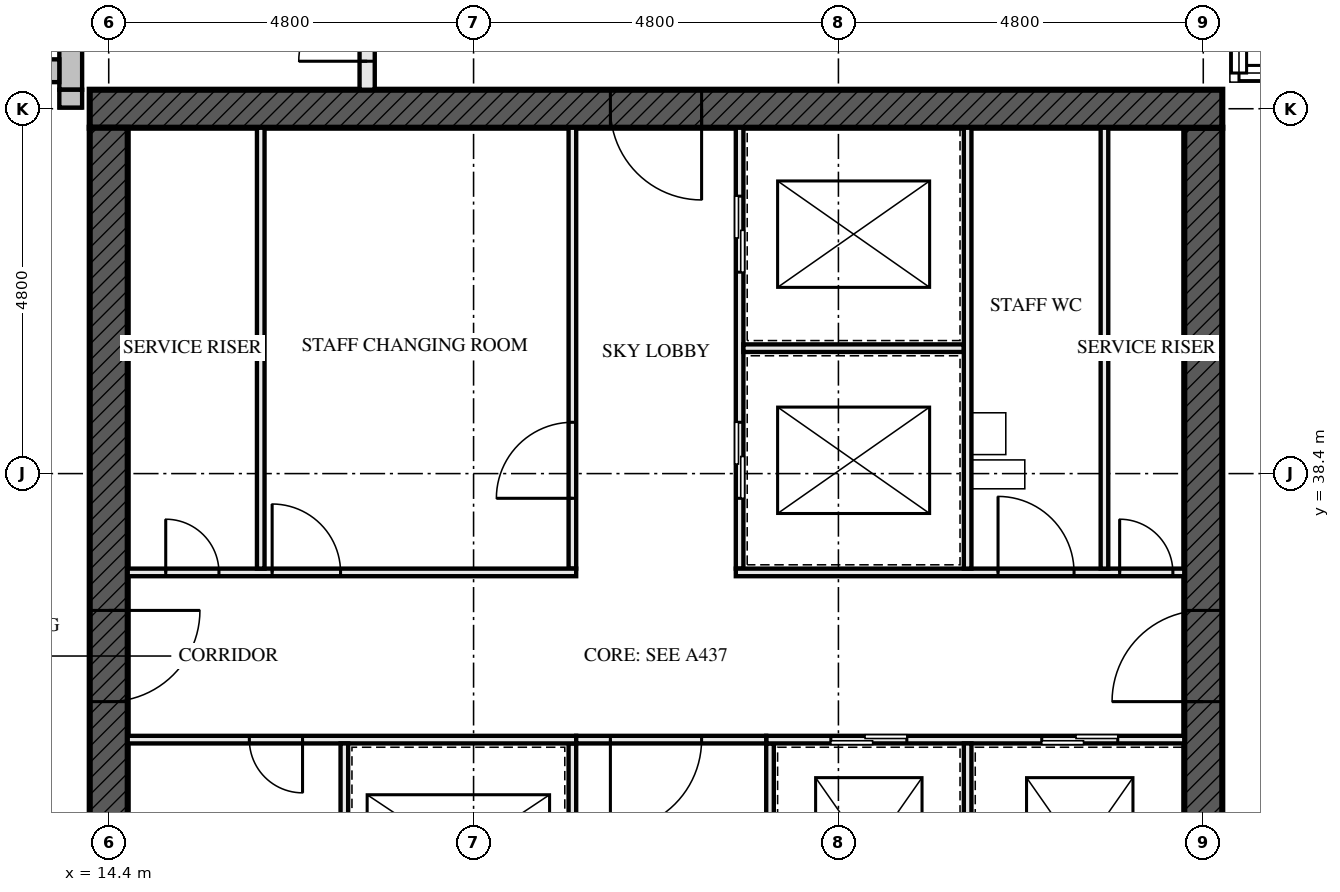
"""IFC4 building model, lengths in metres.
Left out: names, types, materials, properties, quantities, classifications, styles, units other than length and angle.
Written with IfcOpenShell. Run it as: python <this file> out.ifc"""

import sys

from ifc_helpers import new_model, si_unit, direction, frame, frame_2d, origin, place, context, subcontext, project, spatial, rectangle, extrude, element, fill, save


model = new_model("IFC4")
c1 = context("Model", 3, precision=1e-05, world=origin(), true_north=direction((0.0, 1.0)))
c2 = subcontext(c1, "Body", "Model", "MODEL_VIEW")
j1 = project(units=[si_unit("LENGTHUNIT", "METRE"), si_unit("PLANEANGLEUNIT", "RADIAN")], contexts=[c1])
p1 = place(None, origin())
s1 = spatial("IfcSite", under=j1, at=p1, CompositionType="ELEMENT")
p2 = place(p1, origin())
s2 = spatial("IfcBuilding", under=s1, at=p2, CompositionType="ELEMENT")
p3 = place(p2, frame((0.0, 0.0, 141.0)))
s3 = spatial("IfcBuildingStorey", under=s2, at=p3, CompositionType="ELEMENT", Elevation=141.0)
p4 = place(p3, frame((29.05, 43.2, -0.17), z_axis=(0.0, 0.0, 1.0), x_axis=(-1.0, 0.0, 0.0)))
e1 = element("IfcWall", 1, at=p4, inside=s3, PredefinedType="SHEAR", context=c2, shape_type="SweptSolid", body=[
    extrude(rectangle(XDim=14.9, YDim=0.5, at=frame_2d((7.45, 0.0))), origin(), (0.0, 0.0, 1.0), 3.5),
])
p5 = place(p4, frame((6.85, 0.0, 0.17)))
e2 = element("IfcOpeningElement", 2, at=p5, cuts=e1, PredefinedType="OPENING", context=c2, shape_type="SweptSolid", body=[
    extrude(rectangle(XDim=1.2, YDim=2.1, at=frame_2d((0.6, 1.05))), frame((0.0, 0.26, 0.0), z_axis=(0.0, -1.0, 0.0), x_axis=(1.0, 0.0, 0.0)), (0.0, 0.0, 1.0), 0.521),
])
p6 = place(p3, frame((14.4, 42.95, -0.17), z_axis=(0.0, 0.0, 1.0), x_axis=(0.0, -1.0, 0.0)))
e3 = element("IfcWall", 3, at=p6, inside=s3, PredefinedType="SHEAR", context=c2, shape_type="SweptSolid", body=[
    extrude(rectangle(XDim=13.9, YDim=0.5, at=frame_2d((6.95, 0.0))), origin(), (0.0, 0.0, 1.0), 3.5),
])
p7 = place(p6, frame((6.35, 0.0, 0.17)))
e4 = element("IfcOpeningElement", 4, at=p7, cuts=e3, PredefinedType="OPENING", context=c2, shape_type="SweptSolid", body=[
    extrude(rectangle(XDim=1.2, YDim=2.1, at=frame_2d((0.6, 1.05))), frame((0.0, 0.26, 0.0), z_axis=(0.0, -1.0, 0.0), x_axis=(1.0, 0.0, 0.0)), (0.0, 0.0, 1.0), 0.521),
])
p8 = place(p3, frame((28.8, 29.05, -0.17), z_axis=(0.0, 0.0, 1.0), x_axis=(0.0, 1.0, 0.0)))
e5 = element("IfcWall", 5, at=p8, inside=s3, PredefinedType="SHEAR", context=c2, shape_type="SweptSolid", body=[
    extrude(rectangle(XDim=13.9, YDim=0.5, at=frame_2d((6.95, 0.0))), origin(), (0.0, 0.0, 1.0), 3.5),
])
p9 = place(p8, frame((6.35, 0.0, 0.17)))
e6 = element("IfcOpeningElement", 6, at=p9, cuts=e5, PredefinedType="OPENING", context=c2, shape_type="SweptSolid", body=[
    extrude(rectangle(XDim=1.2, YDim=2.1, at=frame_2d((0.6, 1.05))), frame((0.0, 0.26, 0.0), z_axis=(0.0, -1.0, 0.0), x_axis=(1.0, 0.0, 0.0)), (0.0, 0.0, 1.0), 0.521),
])
p10 = place(p3, frame((13.9, 53.15, 0.0), z_axis=(0.0, 0.0, 1.0), x_axis=(0.0, -1.0, 0.0)))
e7 = element("IfcWall", 7, at=p10, inside=s3, PredefinedType="SOLIDWALL", context=c2, shape_type="SweptSolid", body=[
    extrude(rectangle(XDim=9.7, YDim=0.3, at=frame_2d((4.85, 0.0))), origin(), (0.0, 0.0, 1.0), 3.5),
])
p11 = place(p10, frame((2.25, 0.0, 0.0)))
e8 = element("IfcOpeningElement", 8, at=p11, cuts=e7, PredefinedType="OPENING", context=c2, shape_type="SweptSolid", body=[
    extrude(rectangle(XDim=1.0, YDim=2.4, at=frame_2d((0.5, 1.2))), frame((0.0, 0.161, 0.0), z_axis=(0.0, -1.0, 0.0), x_axis=(1.0, 0.0, 0.0)), (0.0, 0.0, 1.0), 0.321),
])
p12 = place(p10, frame((6.35, 0.0, 0.6)))
e9 = element("IfcOpeningElement", 9, at=p12, cuts=e7, PredefinedType="OPENING", context=c2, shape_type="SweptSolid", body=[
    extrude(rectangle(XDim=2.4, YDim=1.8, at=frame_2d((1.2, 0.9))), frame((0.0, 0.161, 0.0), z_axis=(0.0, -1.0, 0.0), x_axis=(1.0, 0.0, 0.0)), (0.0, 0.0, 1.0), 0.321),
])
p13 = place(p3, frame((13.75, 43.7, 0.0), z_axis=(0.0, 0.0, 1.0), x_axis=(-1.0, 0.0, 0.0)))
e10 = element("IfcWall", 10, at=p13, inside=s3, PredefinedType="SOLIDWALL", context=c2, shape_type="SweptSolid", body=[
    extrude(rectangle(XDim=9.6, YDim=0.3, at=frame_2d((4.8, 0.0))), origin(), (0.0, 0.0, 1.0), 3.5),
])
p14 = place(p13, frame((5.35, 0.0, 0.6)))
e11 = element("IfcOpeningElement", 11, at=p14, cuts=e10, PredefinedType="OPENING", context=c2, shape_type="SweptSolid", body=[
    extrude(rectangle(XDim=2.4, YDim=1.8, at=frame_2d((1.2, 0.9))), frame((0.0, 0.161, 0.0), z_axis=(0.0, -1.0, 0.0), x_axis=(1.0, 0.0, 0.0)), (0.0, 0.0, 1.0), 0.321),
])
p15 = place(p13, frame((0.55, 0.0, 0.6)))
e12 = element("IfcOpeningElement", 12, at=p15, cuts=e10, PredefinedType="OPENING", context=c2, shape_type="SweptSolid", body=[
    extrude(rectangle(XDim=2.4, YDim=1.8, at=frame_2d((1.2, 0.9))), frame((0.0, 0.161, 0.0), z_axis=(0.0, -1.0, 0.0), x_axis=(1.0, 0.0, 0.0)), (0.0, 0.0, 1.0), 0.321),
])
p16 = place(p3, frame((13.9, 43.45, 2.39), z_axis=(0.0, 0.0, 1.0), x_axis=(0.0, -1.0, 0.0)))
e13 = element("IfcWall", 13, at=p16, inside=s3, PredefinedType="SOLIDWALL", context=c2, shape_type="SweptSolid", body=[
    extrude(rectangle(XDim=0.235, YDim=0.3, at=frame_2d((0.117, 0.0))), origin(), (0.0, 0.0, 1.0), 0.88),
])
for number, where, z_axis, x_axis in (
    (14, (16.4, 37.15, 0.0), (0.0, 0.0, 1.0), (0.0, 1.0, 0.0)),
    (15, (27.5, 37.15, 0.0), (0.0, 0.0, 1.0), (0.0, 1.0, 0.0)),
):
    element("IfcWall", number, at=place(p3, frame(where, z_axis=z_axis, x_axis=x_axis)), inside=s3, PredefinedType="SOLIDWALL", context=c2, shape_type="SweptSolid", body=[
        extrude(rectangle(XDim=5.8, YDim=0.1, at=frame_2d((2.9, 0.0))), origin(), (0.0, 0.0, 1.0), 3.33),
    ])
p17 = place(p3, frame((20.5, 29.05, 0.0), z_axis=(0.0, 0.0, 1.0), x_axis=(0.0, 1.0, 0.0)))
e16 = element("IfcWall", 16, at=p17, inside=s3, PredefinedType="SOLIDWALL", context=c2, shape_type="SweptSolid", body=[
    extrude(rectangle(XDim=5.8, YDim=0.1, at=frame_2d((2.9, 0.0))), origin(), (0.0, 0.0, 1.0), 3.33),
])
p18 = place(p17, frame((0.8, 0.0, 0.0)))
e17 = element("IfcOpeningElement", 17, at=p18, cuts=e16, PredefinedType="OPENING", context=c2, shape_type="SweptSolid", body=[
    extrude(rectangle(XDim=1.1, YDim=2.3, at=frame_2d((0.55, 1.15))), frame((0.0, 0.061, 0.0), z_axis=(0.0, -1.0, 0.0), x_axis=(1.0, 0.0, 0.0)), (0.0, 0.0, 1.0), 0.121),
])
p19 = place(p17, frame((3.775, 0.0, 0.0)))
e18 = element("IfcOpeningElement", 18, at=p19, cuts=e16, PredefinedType="OPENING", context=c2, shape_type="SweptSolid", body=[
    extrude(rectangle(XDim=1.1, YDim=2.3, at=frame_2d((0.55, 1.15))), frame((0.0, 0.061, 0.0), z_axis=(0.0, -1.0, 0.0), x_axis=(1.0, 0.0, 0.0)), (0.0, 0.0, 1.0), 0.121),
])
p20 = place(p3, frame((20.5, 37.15, 0.0), z_axis=(0.0, 0.0, 1.0), x_axis=(0.0, 1.0, 0.0)))
e19 = element("IfcWall", 19, at=p20, inside=s3, PredefinedType="SOLIDWALL", context=c2, shape_type="SweptSolid", body=[
    extrude(rectangle(XDim=5.8, YDim=0.1, at=frame_2d((2.9, 0.0))), origin(), (0.0, 0.0, 1.0), 3.33),
])
p21 = place(p20, frame((0.925, 0.0, 0.0)))
e20 = element("IfcOpeningElement", 20, at=p21, cuts=e19, PredefinedType="OPENING", context=c2, shape_type="SweptSolid", body=[
    extrude(rectangle(XDim=1.0, YDim=2.1, at=frame_2d((0.5, 1.05))), frame((0.0, 0.061, 0.0), z_axis=(0.0, -1.0, 0.0), x_axis=(1.0, 0.0, 0.0)), (0.0, 0.0, 1.0), 0.121),
])
p22 = place(p3, frame((22.7, 37.15, 0.0), z_axis=(0.0, 0.0, 1.0), x_axis=(0.0, 1.0, 0.0)))
e21 = element("IfcWall", 21, at=p22, inside=s3, PredefinedType="SOLIDWALL", context=c2, shape_type="SweptSolid", body=[
    extrude(rectangle(XDim=5.8, YDim=0.1, at=frame_2d((2.9, 0.0))), origin(), (0.0, 0.0, 1.0), 3.33),
])
p23 = place(p22, frame((0.925, 0.0, 0.0)))
e22 = element("IfcOpeningElement", 22, at=p23, cuts=e21, PredefinedType="OPENING", context=c2, shape_type="SweptSolid", body=[
    extrude(rectangle(XDim=1.0, YDim=2.1, at=frame_2d((0.5, 1.05))), frame((0.0, 0.061, 0.0), z_axis=(0.0, -1.0, 0.0), x_axis=(1.0, 0.0, 0.0)), (0.0, 0.0, 1.0), 0.121),
])
p24 = place(p22, frame((3.9, 0.0, 0.0)))
e23 = element("IfcOpeningElement", 23, at=p24, cuts=e21, PredefinedType="OPENING", context=c2, shape_type="SweptSolid", body=[
    extrude(rectangle(XDim=1.0, YDim=2.1, at=frame_2d((0.5, 1.05))), frame((0.0, 0.061, 0.0), z_axis=(0.0, -1.0, 0.0), x_axis=(1.0, 0.0, 0.0)), (0.0, 0.0, 1.0), 0.121),
])
p25 = place(p3, frame((23.1, 29.05, 0.0), z_axis=(0.0, 0.0, 1.0), x_axis=(0.0, 1.0, 0.0)))
e24 = element("IfcWall", 24, at=p25, inside=s3, PredefinedType="SOLIDWALL", context=c2, shape_type="SweptSolid", body=[
    extrude(rectangle(XDim=5.8, YDim=0.1, at=frame_2d((2.9, 0.0))), origin(), (0.0, 0.0, 1.0), 3.33),
])
p26 = place(p25, frame((1.0, 0.0, 0.0)))
e25 = element("IfcOpeningElement", 25, at=p26, cuts=e24, PredefinedType="OPENING", context=c2, shape_type="SweptSolid", body=[
    extrude(rectangle(XDim=0.7, YDim=2.1, at=frame_2d((0.35, 1.05))), frame((0.0, 0.061, 0.0), z_axis=(0.0, -1.0, 0.0), x_axis=(1.0, 0.0, 0.0)), (0.0, 0.0, 1.0), 0.121),
])
p27 = place(p3, frame((14.65, 34.9, 0.0), z_axis=(0.0, 0.0, 1.0), x_axis=(1.0, 0.0, 0.0)))
e26 = element("IfcWall", 26, at=p27, inside=s3, PredefinedType="SOLIDWALL", context=c2, shape_type="SweptSolid", body=[
    extrude(rectangle(XDim=5.9, YDim=0.1, at=frame_2d((2.95, 0.0))), origin(), (0.0, 0.0, 1.0), 3.33),
])
p28 = place(p27, frame((1.6, 0.0, 0.0)))
e27 = element("IfcOpeningElement", 27, at=p28, cuts=e26, PredefinedType="OPENING", context=c2, shape_type="SweptSolid", body=[
    extrude(rectangle(XDim=0.7, YDim=2.1, at=frame_2d((0.35, 1.05))), frame((0.0, 0.061, 0.0), z_axis=(0.0, -1.0, 0.0), x_axis=(1.0, 0.0, 0.0)), (0.0, 0.0, 1.0), 0.121),
])
p29 = place(p3, frame((23.05, 34.9, 0.0), z_axis=(0.0, 0.0, 1.0), x_axis=(1.0, 0.0, 0.0)))
e28 = element("IfcWall", 28, at=p29, inside=s3, PredefinedType="SOLIDWALL", context=c2, shape_type="SweptSolid", body=[
    extrude(rectangle(XDim=5.5, YDim=0.1, at=frame_2d((2.75, 0.0))), origin(), (0.0, 0.0, 1.0), 3.33),
])
p30 = place(p29, frame((0.85, 0.0, 0.0)))
e29 = element("IfcOpeningElement", 29, at=p30, cuts=e28, PredefinedType="OPENING", context=c2, shape_type="SweptSolid", body=[
    extrude(rectangle(XDim=1.0, YDim=2.1, at=frame_2d((0.5, 1.05))), frame((0.0, 0.061, 0.0), z_axis=(0.0, -1.0, 0.0), x_axis=(1.0, 0.0, 0.0)), (0.0, 0.0, 1.0), 0.121),
])
p31 = place(p29, frame((3.625, 0.0, 0.0)))
e30 = element("IfcOpeningElement", 30, at=p31, cuts=e28, PredefinedType="OPENING", context=c2, shape_type="SweptSolid", body=[
    extrude(rectangle(XDim=1.0, YDim=2.1, at=frame_2d((0.5, 1.05))), frame((0.0, 0.061, 0.0), z_axis=(0.0, -1.0, 0.0), x_axis=(1.0, 0.0, 0.0)), (0.0, 0.0, 1.0), 0.121),
])
p32 = place(p3, frame((14.65, 37.1, 0.0), z_axis=(0.0, 0.0, 1.0), x_axis=(1.0, 0.0, 0.0)))
e31 = element("IfcWall", 31, at=p32, inside=s3, PredefinedType="SOLIDWALL", context=c2, shape_type="SweptSolid", body=[
    extrude(rectangle(XDim=5.9, YDim=0.1, at=frame_2d((2.95, 0.0))), origin(), (0.0, 0.0, 1.0), 3.33),
])
p33 = place(p32, frame((0.5, 0.0, 0.0)))
e32 = element("IfcOpeningElement", 32, at=p33, cuts=e31, PredefinedType="OPENING", context=c2, shape_type="SweptSolid", body=[
    extrude(rectangle(XDim=0.7, YDim=2.1, at=frame_2d((0.35, 1.05))), frame((0.0, 0.061, 0.0), z_axis=(0.0, -1.0, 0.0), x_axis=(1.0, 0.0, 0.0)), (0.0, 0.0, 1.0), 0.121),
])
p34 = place(p32, frame((1.9, 0.0, 0.0)))
e33 = element("IfcOpeningElement", 33, at=p34, cuts=e31, PredefinedType="OPENING", context=c2, shape_type="SweptSolid", body=[
    extrude(rectangle(XDim=0.9, YDim=2.1, at=frame_2d((0.45, 1.05))), frame((0.0, 0.061, 0.0), z_axis=(0.0, -1.0, 0.0), x_axis=(1.0, 0.0, 0.0)), (0.0, 0.0, 1.0), 0.121),
])
p35 = place(p3, frame((22.65, 37.1, 0.0), z_axis=(0.0, 0.0, 1.0), x_axis=(1.0, 0.0, 0.0)))
e34 = element("IfcWall", 34, at=p35, inside=s3, PredefinedType="SOLIDWALL", context=c2, shape_type="SweptSolid", body=[
    extrude(rectangle(XDim=5.9, YDim=0.1, at=frame_2d((2.95, 0.0))), origin(), (0.0, 0.0, 1.0), 3.33),
])
p36 = place(p35, frame((3.45, 0.0, 0.0)))
e35 = element("IfcOpeningElement", 35, at=p36, cuts=e34, PredefinedType="OPENING", context=c2, shape_type="SweptSolid", body=[
    extrude(rectangle(XDim=1.0, YDim=2.1, at=frame_2d((0.5, 1.05))), frame((0.0, 0.061, 0.0), z_axis=(0.0, -1.0, 0.0), x_axis=(1.0, 0.0, 0.0)), (0.0, 0.0, 1.0), 0.121),
])
p37 = place(p35, frame((5.05, 0.0, 0.0)))
e36 = element("IfcOpeningElement", 36, at=p37, cuts=e34, PredefinedType="OPENING", context=c2, shape_type="SweptSolid", body=[
    extrude(rectangle(XDim=0.7, YDim=2.1, at=frame_2d((0.35, 1.05))), frame((0.0, 0.061, 0.0), z_axis=(0.0, -1.0, 0.0), x_axis=(1.0, 0.0, 0.0)), (0.0, 0.0, 1.0), 0.121),
])
p38 = place(p3, frame((20.55, 34.9, 0.0), z_axis=(0.0, 0.0, 1.0), x_axis=(1.0, 0.0, 0.0)))
e37 = element("IfcWall", 37, at=p38, inside=s3, PredefinedType="SOLIDWALL", context=c2, shape_type="SweptSolid", body=[
    extrude(rectangle(XDim=2.5, YDim=0.1, at=frame_2d((1.25, 0.0))), origin(), (0.0, 0.0, 1.0), 3.33),
])
p39 = place(p38, frame((0.45, 0.0, 0.0)))
e38 = element("IfcOpeningElement", 38, at=p39, cuts=e37, PredefinedType="OPENING", context=c2, shape_type="SweptSolid", body=[
    extrude(rectangle(XDim=1.2, YDim=2.1, at=frame_2d((0.6, 1.05))), frame((0.0, 0.061, 0.0), z_axis=(0.0, -1.0, 0.0), x_axis=(1.0, 0.0, 0.0)), (0.0, 0.0, 1.0), 0.121),
])
p40 = place(p3, frame((17.5, 29.05, 0.0), z_axis=(0.0, 0.0, 1.0), x_axis=(0.0, 1.0, 0.0)))
e39 = element("IfcWall", 39, at=p40, inside=s3, PredefinedType="SOLIDWALL", context=c2, shape_type="SweptSolid", body=[
    extrude(rectangle(XDim=5.8, YDim=0.1, at=frame_2d((2.9, 0.0))), origin(), (0.0, 0.0, 1.0), 3.33),
])
p41 = place(p3, frame((22.75, 40.05, 0.0), z_axis=(0.0, 0.0, 1.0), x_axis=(1.0, 0.0, 0.0)))
e40 = element("IfcWall", 40, at=p41, inside=s3, PredefinedType="SOLIDWALL", context=c2, shape_type="SweptSolid", body=[
    extrude(rectangle(XDim=2.9, YDim=0.1, at=frame_2d((1.45, 0.0))), origin(), (0.0, 0.0, 1.0), 3.33),
])
p42 = place(p3, frame((25.7, 37.15, 0.0), z_axis=(0.0, 0.0, 1.0), x_axis=(0.0, 1.0, 0.0)))
e41 = element("IfcWall", 41, at=p42, inside=s3, PredefinedType="SOLIDWALL", context=c2, shape_type="SweptSolid", body=[
    extrude(rectangle(XDim=5.8, YDim=0.1, at=frame_2d((2.9, 0.0))), origin(), (0.0, 0.0, 1.0), 3.33),
])
p43 = place(p3, frame((25.7, 31.95, 0.0), z_axis=(0.0, 0.0, 1.0), x_axis=(0.0, 1.0, 0.0)))
e42 = element("IfcWall", 42, at=p43, inside=s3, PredefinedType="SOLIDWALL", context=c2, shape_type="SweptSolid", body=[
    extrude(rectangle(XDim=2.9, YDim=0.1, at=frame_2d((1.45, 0.0))), origin(), (0.0, 0.0, 1.0), 3.33),
])
p44 = place(p3, frame((17.8, 45.1, 0.0), z_axis=(0.0, 0.0, 1.0), x_axis=(0.0, -1.0, 0.0)))
e43 = element("IfcWall", 43, at=p44, inside=s3, PredefinedType="PARTITIONING", context=c2, shape_type="SweptSolid", body=[
    extrude(rectangle(XDim=1.65, YDim=0.2, at=frame_2d((0.825, 0.0))), origin(), (0.0, 0.0, 1.0), 3.33),
])
p45 = place(p44, frame((0.375, 0.0, 0.0)))
e44 = element("IfcOpeningElement", 44, at=p45, cuts=e43, PredefinedType="OPENING", context=c2, shape_type="SweptSolid", body=[
    extrude(rectangle(XDim=0.9, YDim=2.1, at=frame_2d((0.45, 1.05))), frame((0.0, 0.111, 0.0), z_axis=(0.0, -1.0, 0.0), x_axis=(1.0, 0.0, 0.0)), (0.0, 0.0, 1.0), 0.221),
])
p46 = place(p21, origin())
e45 = element("IfcDoor", 45, at=p46, inside=s3, OperationType="SINGLE_SWING_RIGHT", PredefinedType="DOOR", context=c2, shape_type="SweptSolid", body=[
    extrude(rectangle(XDim=1.0, YDim=2.1, at=frame_2d((0.5, 1.05))), frame((0.0, 0.027, 0.0), z_axis=(0.0, -1.0, 0.0), x_axis=(1.0, 0.0, 0.0)), (0.0, 0.0, 1.0), 0.054),
])
fill(e20, e45)
p47 = place(p23, origin())
e46 = element("IfcDoor", 46, at=p47, inside=s3, OperationType="SLIDING_TO_LEFT", PredefinedType="DOOR", context=c2, shape_type="SweptSolid", body=[
    extrude(rectangle(XDim=1.0, YDim=2.1, at=frame_2d((0.5, 1.05))), frame((0.0, 0.05, 0.0), z_axis=(0.0, -1.0, 0.0), x_axis=(1.0, 0.0, 0.0)), (0.0, 0.0, 1.0), 0.1),
])
fill(e22, e46)
p48 = place(p24, origin())
e47 = element("IfcDoor", 47, at=p48, inside=s3, OperationType="SLIDING_TO_LEFT", PredefinedType="DOOR", context=c2, shape_type="SweptSolid", body=[
    extrude(rectangle(XDim=1.0, YDim=2.1, at=frame_2d((0.5, 1.05))), frame((0.0, 0.05, 0.0), z_axis=(0.0, -1.0, 0.0), x_axis=(1.0, 0.0, 0.0)), (0.0, 0.0, 1.0), 0.1),
])
fill(e23, e47)
p49 = place(p28, frame((0.7, 0.0, 0.0), z_axis=(0.0, 0.0, 1.0), x_axis=(-1.0, 0.0, 0.0)))
e48 = element("IfcDoor", 48, at=p49, inside=s3, OperationType="SINGLE_SWING_RIGHT", PredefinedType="DOOR", context=c2, shape_type="SweptSolid", body=[
    extrude(rectangle(XDim=0.7, YDim=2.1, at=frame_2d((0.35, 1.05))), frame((0.0, 0.027, 0.0), z_axis=(0.0, -1.0, 0.0), x_axis=(1.0, 0.0, 0.0)), (0.0, 0.0, 1.0), 0.054),
])
fill(e27, e48)
p50 = place(p30, origin())
e49 = element("IfcDoor", 49, at=p50, inside=s3, OperationType="SLIDING_TO_LEFT", PredefinedType="DOOR", context=c2, shape_type="SweptSolid", body=[
    extrude(rectangle(XDim=1.0, YDim=2.1, at=frame_2d((0.5, 1.05))), frame((0.0, 0.05, 0.0), z_axis=(0.0, -1.0, 0.0), x_axis=(1.0, 0.0, 0.0)), (0.0, 0.0, 1.0), 0.1),
])
fill(e29, e49)
p51 = place(p31, origin())
e50 = element("IfcDoor", 50, at=p51, inside=s3, OperationType="SLIDING_TO_LEFT", PredefinedType="DOOR", context=c2, shape_type="SweptSolid", body=[
    extrude(rectangle(XDim=1.0, YDim=2.1, at=frame_2d((0.5, 1.05))), frame((0.0, 0.05, 0.0), z_axis=(0.0, -1.0, 0.0), x_axis=(1.0, 0.0, 0.0)), (0.0, 0.0, 1.0), 0.1),
])
fill(e30, e50)
p52 = place(p33, origin())
e51 = element("IfcDoor", 51, at=p52, inside=s3, OperationType="SINGLE_SWING_RIGHT", PredefinedType="DOOR", context=c2, shape_type="SweptSolid", body=[
    extrude(rectangle(XDim=0.7, YDim=2.1, at=frame_2d((0.35, 1.05))), frame((0.0, 0.027, 0.0), z_axis=(0.0, -1.0, 0.0), x_axis=(1.0, 0.0, 0.0)), (0.0, 0.0, 1.0), 0.054),
])
fill(e32, e51)
p53 = place(p34, origin())
e52 = element("IfcDoor", 52, at=p53, inside=s3, OperationType="SINGLE_SWING_RIGHT", PredefinedType="DOOR", context=c2, shape_type="SweptSolid", body=[
    extrude(rectangle(XDim=0.9, YDim=2.1, at=frame_2d((0.45, 1.05))), frame((0.0, 0.027, 0.0), z_axis=(0.0, -1.0, 0.0), x_axis=(1.0, 0.0, 0.0)), (0.0, 0.0, 1.0), 0.054),
])
fill(e33, e52)
p54 = place(p36, origin())
e53 = element("IfcDoor", 53, at=p54, inside=s3, OperationType="SINGLE_SWING_RIGHT", PredefinedType="DOOR", context=c2, shape_type="SweptSolid", body=[
    extrude(rectangle(XDim=1.0, YDim=2.1, at=frame_2d((0.5, 1.05))), frame((0.0, 0.027, 0.0), z_axis=(0.0, -1.0, 0.0), x_axis=(1.0, 0.0, 0.0)), (0.0, 0.0, 1.0), 0.054),
])
fill(e35, e53)
p55 = place(p37, origin())
e54 = element("IfcDoor", 54, at=p55, inside=s3, OperationType="SINGLE_SWING_RIGHT", PredefinedType="DOOR", context=c2, shape_type="SweptSolid", body=[
    extrude(rectangle(XDim=0.7, YDim=2.1, at=frame_2d((0.35, 1.05))), frame((0.0, 0.027, 0.0), z_axis=(0.0, -1.0, 0.0), x_axis=(1.0, 0.0, 0.0)), (0.0, 0.0, 1.0), 0.054),
])
fill(e36, e54)
p56 = place(p39, frame((1.2, 0.0, 0.0), z_axis=(0.0, 0.0, 1.0), x_axis=(-1.0, 0.0, 0.0)))
e55 = element("IfcDoor", 55, at=p56, inside=s3, OperationType="SINGLE_SWING_LEFT", PredefinedType="DOOR", context=c2, shape_type="SweptSolid", body=[
    extrude(rectangle(XDim=1.2, YDim=2.1, at=frame_2d((0.6, 1.05))), frame((0.0, 0.027, 0.0), z_axis=(0.0, -1.0, 0.0), x_axis=(1.0, 0.0, 0.0)), (0.0, 0.0, 1.0), 0.054),
])
fill(e38, e55)
p57 = place(p45, frame((0.9, 0.0, 0.0), z_axis=(0.0, 0.0, 1.0), x_axis=(-1.0, 0.0, 0.0)))
e56 = element("IfcDoor", 56, at=p57, inside=s3, OperationType="SINGLE_SWING_RIGHT", PredefinedType="DOOR", context=c2, shape_type="SweptSolid", body=[
    extrude(rectangle(XDim=0.9, YDim=2.1, at=frame_2d((0.45, 1.05))), frame((0.0, 0.027, 0.0), z_axis=(0.0, -1.0, 0.0), x_axis=(1.0, 0.0, 0.0)), (0.0, 0.0, 1.0), 0.054),
])
fill(e44, e56)
p58 = place(p7, origin())
e57 = element("IfcDoor", 57, at=p58, inside=s3, OperationType="SINGLE_SWING_LEFT", PredefinedType="DOOR", context=c2, shape_type="SweptSolid", body=[
    extrude(rectangle(XDim=1.2, YDim=2.1, at=frame_2d((0.6, 1.05))), frame((0.0, 0.027, 0.0), z_axis=(0.0, -1.0, 0.0), x_axis=(1.0, 0.0, 0.0)), (0.0, 0.0, 1.0), 0.054),
])
fill(e4, e57)
p59 = place(p9, origin())
e58 = element("IfcDoor", 58, at=p59, inside=s3, OperationType="SINGLE_SWING_LEFT", PredefinedType="DOOR", context=c2, shape_type="SweptSolid", body=[
    extrude(rectangle(XDim=1.2, YDim=2.1, at=frame_2d((0.6, 1.05))), frame((0.0, 0.027, 0.0), z_axis=(0.0, -1.0, 0.0), x_axis=(1.0, 0.0, 0.0)), (0.0, 0.0, 1.0), 0.054),
])
fill(e6, e58)
p60 = place(p5, origin())
e59 = element("IfcDoor", 59, at=p60, inside=s3, OperationType="SINGLE_SWING_LEFT", PredefinedType="DOOR", context=c2, shape_type="SweptSolid", body=[
    extrude(rectangle(XDim=1.2, YDim=2.1, at=frame_2d((0.6, 1.05))), frame((0.0, 0.027, 0.0), z_axis=(0.0, -1.0, 0.0), x_axis=(1.0, 0.0, 0.0)), (0.0, 0.0, 1.0), 0.054),
])
fill(e2, e59)
save(model, sys.argv[1])
